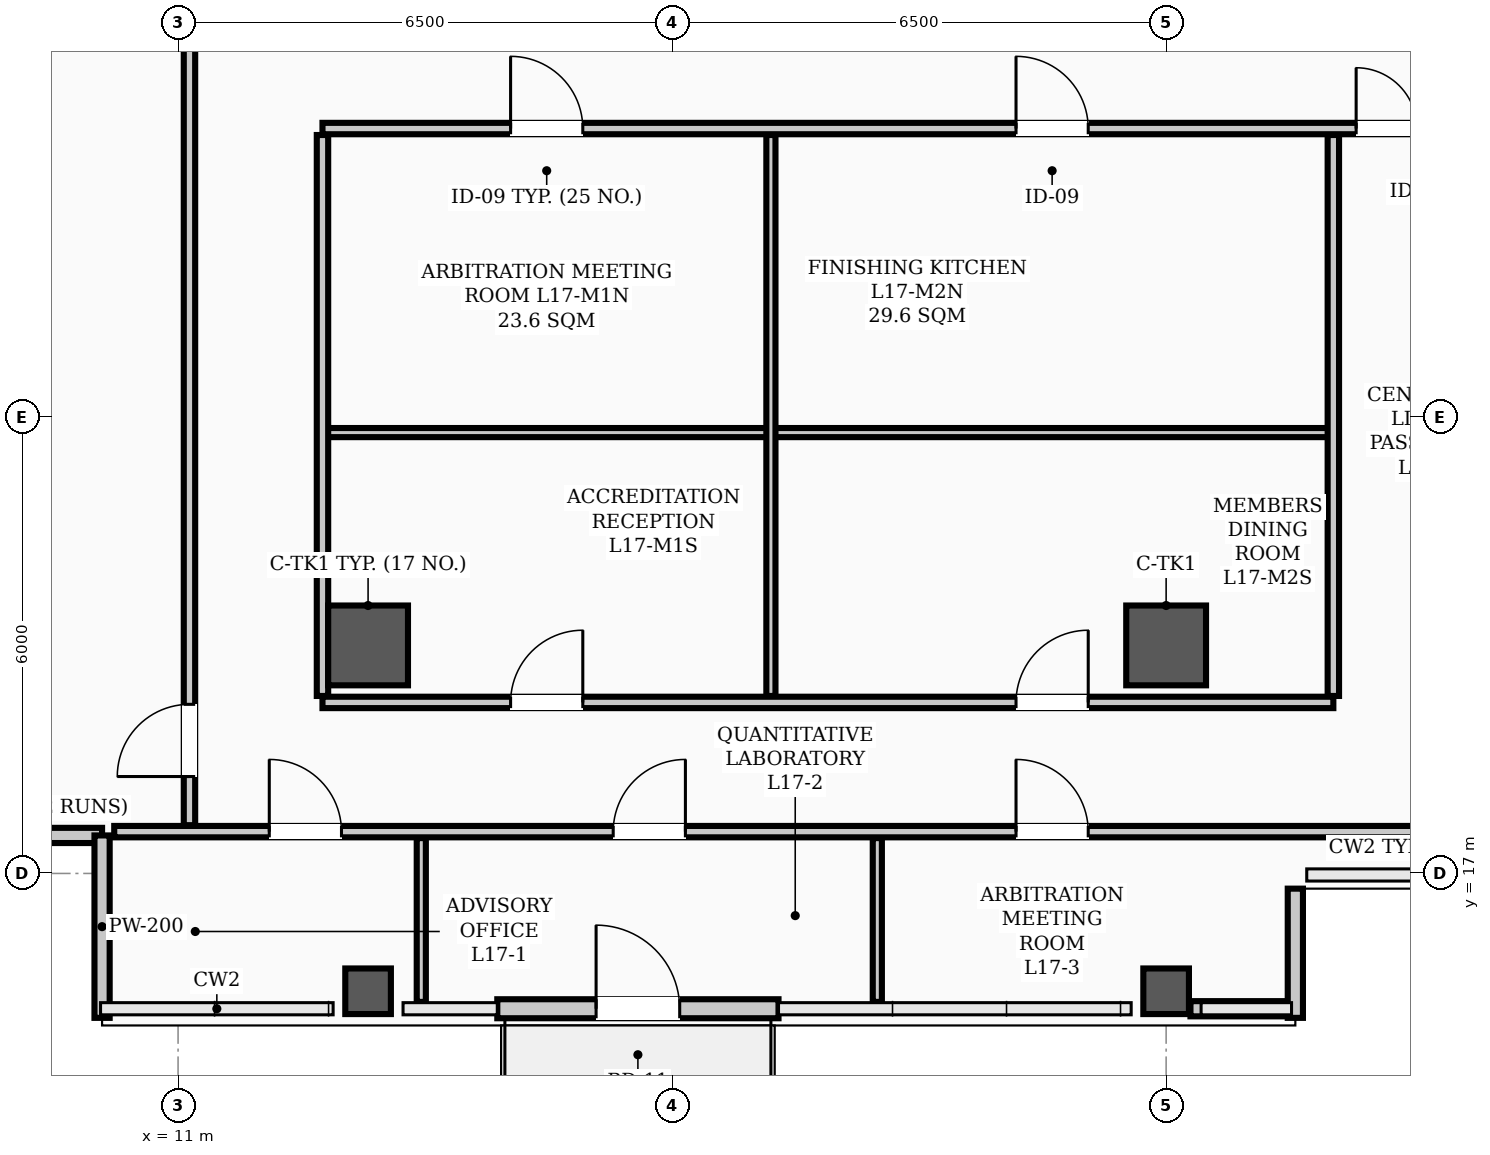
"""IFC4 building model, lengths in metres.
Left out: names, types, materials, properties, quantities, classifications, styles, units other than length and angle.
Written with IfcOpenShell. Run it as: python <this file> out.ifc"""

import sys

from ifc_helpers import new_model, si_unit, direction, frame, frame_2d, origin, origin_2d, place, context, subcontext, project, spatial, rectangle, hollow_rectangle, extrude, element, fill, save


model = new_model("IFC4")
c1 = context("Model", 3, precision=1e-05, world=origin(), true_north=direction((0.0, 1.0)))
c2 = subcontext(c1, "Body", "Model", "MODEL_VIEW")
j1 = project(units=[si_unit("LENGTHUNIT", "METRE"), si_unit("PLANEANGLEUNIT", "RADIAN")], contexts=[c1])
p1 = place(None, origin())
s1 = spatial("IfcSite", under=j1, at=p1, CompositionType="ELEMENT")
p2 = place(p1, origin())
s2 = spatial("IfcBuilding", under=s1, at=p2, CompositionType="ELEMENT")
p3 = place(p2, frame((0.0, 0.0, 69.4)))
s3 = spatial("IfcBuildingStorey", under=s2, at=p3, CompositionType="ELEMENT", Elevation=69.4)
for number, where, z_axis, x_axis in (
    (1, (13.5, 20.0, 0.0), (0.0, 0.0, 1.0), (1.0, 0.0, 0.0)),
    (2, (24.0, 20.0, 0.0), (0.0, 0.0, 1.0), (1.0, 0.0, 0.0)),
):
    element("IfcColumn", number, at=place(p3, frame(where, z_axis=z_axis, x_axis=x_axis)), inside=s3, PredefinedType="COLUMN", context=c2, shape_type="SweptSolid", body=[
        extrude(hollow_rectangle(XDim=1.05, YDim=1.05, WallThickness=0.038, InnerFilletRadius=0.019, OuterFilletRadius=0.057, at=origin_2d()), origin(), (0.0, 0.0, 1.0), 3.9),
    ])
for number, where, z_axis, x_axis in (
    (3, (13.5, 15.45, 0.0), (0.0, 0.0, 1.0), (1.0, 0.0, 0.0)),
    (4, (24.0, 15.45, 0.0), (0.0, 0.0, 1.0), (1.0, 0.0, 0.0)),
):
    element("IfcColumn", number, at=place(p3, frame(where, z_axis=z_axis, x_axis=x_axis)), inside=s3, PredefinedType="COLUMN", context=c2, shape_type="SweptSolid", body=[
        extrude(hollow_rectangle(XDim=0.6, YDim=0.6, WallThickness=0.026, InnerFilletRadius=0.013, OuterFilletRadius=0.039, at=origin_2d()), origin(), (0.0, 0.0, 1.0), 3.9),
    ])
p4 = place(p3, frame((24.32, 15.22, 0.0), z_axis=(0.0, 0.0, 1.0), x_axis=(1.0, 0.0, 0.0)))
e5 = element("IfcWall", 5, at=p4, inside=s3, PredefinedType="PARAPET", context=c2, shape_type="SweptSolid", body=[
    extrude(rectangle(XDim=1.33, YDim=0.2, at=frame_2d((0.665, 0.0))), origin(), (0.0, 0.0, 1.0), 1.2),
])
for number, where, z_axis, x_axis in (
    (6, (7.6, 17.5, 0.0), (0.0, 0.0, 1.0), (1.0, 0.0, 0.0)),
    (7, (10.0, 17.5, 0.0), (0.0, 0.0, 1.0), (0.0, -1.0, 0.0)),
):
    element("IfcWall", number, at=place(p3, frame(where, z_axis=z_axis, x_axis=x_axis)), inside=s3, PredefinedType="PARAPET", context=c2, shape_type="SweptSolid", body=[
        extrude(rectangle(XDim=2.4, YDim=0.2, at=frame_2d((1.2, 0.0))), origin(), (0.0, 0.0, 1.0), 1.2),
    ])
p5 = place(p3, frame((25.7, 15.1, 0.0), z_axis=(0.0, 0.0, 1.0), x_axis=(0.0, 1.0, 0.0)))
e8 = element("IfcWall", 8, at=p5, inside=s3, PredefinedType="PARAPET", context=c2, shape_type="SweptSolid", body=[
    extrude(rectangle(XDim=1.7, YDim=0.2, at=frame_2d((0.85, 0.0))), origin(), (0.0, 0.0, 1.0), 1.2),
])
p6 = place(p3, frame((15.2, 15.22, 0.0), z_axis=(0.0, 0.0, 1.0), x_axis=(1.0, 0.0, 0.0)))
e9 = element("IfcWall", 9, at=p6, inside=s3, PredefinedType="STANDARD", context=c2, shape_type="SweptSolid", body=[
    extrude(rectangle(XDim=3.7, YDim=0.25, at=frame_2d((1.85, 0.0))), origin(), (0.0, 0.0, 1.0), 3.18),
])
p7 = place(p6, frame((1.3, 0.0, 0.0)))
e10 = element("IfcOpeningElement", 10, at=p7, cuts=e9, PredefinedType="OPENING", context=c2, shape_type="SweptSolid", body=[
    extrude(rectangle(XDim=1.1, YDim=2.2, at=frame_2d((0.55, 1.1))), frame((0.0, 0.135, 0.0), z_axis=(0.0, -1.0, 0.0), x_axis=(1.0, 0.0, 0.0)), (0.0, 0.0, 1.0), 0.27),
])
p8 = place(p3, frame((12.9, 26.8, 0.0), z_axis=(0.0, 0.0, 1.0), x_axis=(1.0, 0.0, 0.0)))
e11 = element("IfcWall", 11, at=p8, inside=s3, PredefinedType="PARTITIONING", context=c2, shape_type="SweptSolid", body=[
    extrude(rectangle(XDim=31.7, YDim=0.15, at=frame_2d((15.85, 0.0))), origin(), (0.0, 0.0, 1.0), 3.1),
])
p9 = place(p8, frame((13.6, 0.0, 0.0)))
e12 = element("IfcOpeningElement", 12, at=p9, cuts=e11, PredefinedType="OPENING", context=c2, shape_type="SweptSolid", body=[
    extrude(rectangle(XDim=1.6, YDim=2.08, at=frame_2d((0.8, 1.04))), frame((0.0, 0.085, 0.0), z_axis=(0.0, -1.0, 0.0), x_axis=(1.0, 0.0, 0.0)), (0.0, 0.0, 1.0), 0.17),
])
p10 = place(p8, frame((2.475, 0.0, 0.0)))
e13 = element("IfcOpeningElement", 13, at=p10, cuts=e11, PredefinedType="OPENING", context=c2, shape_type="SweptSolid", body=[
    extrude(rectangle(XDim=0.95, YDim=2.08, at=frame_2d((0.475, 1.04))), frame((0.0, 0.085, 0.0), z_axis=(0.0, -1.0, 0.0), x_axis=(1.0, 0.0, 0.0)), (0.0, 0.0, 1.0), 0.17),
])
p11 = place(p8, frame((9.125, 0.0, 0.0)))
e14 = element("IfcOpeningElement", 14, at=p11, cuts=e11, PredefinedType="OPENING", context=c2, shape_type="SweptSolid", body=[
    extrude(rectangle(XDim=0.95, YDim=2.08, at=frame_2d((0.475, 1.04))), frame((0.0, 0.085, 0.0), z_axis=(0.0, -1.0, 0.0), x_axis=(1.0, 0.0, 0.0)), (0.0, 0.0, 1.0), 0.17),
])
p12 = place(p8, frame((19.125, 0.0, 0.0)))
e15 = element("IfcOpeningElement", 15, at=p12, cuts=e11, PredefinedType="OPENING", context=c2, shape_type="SweptSolid", body=[
    extrude(rectangle(XDim=0.95, YDim=2.08, at=frame_2d((0.475, 1.04))), frame((0.0, 0.085, 0.0), z_axis=(0.0, -1.0, 0.0), x_axis=(1.0, 0.0, 0.0)), (0.0, 0.0, 1.0), 0.17),
])
p13 = place(p8, frame((26.325, 0.0, 0.0)))
e16 = element("IfcOpeningElement", 16, at=p13, cuts=e11, PredefinedType="OPENING", context=c2, shape_type="SweptSolid", body=[
    extrude(rectangle(XDim=0.95, YDim=2.08, at=frame_2d((0.475, 1.04))), frame((0.0, 0.085, 0.0), z_axis=(0.0, -1.0, 0.0), x_axis=(1.0, 0.0, 0.0)), (0.0, 0.0, 1.0), 0.17),
])
p14 = place(p3, frame((10.16, 17.55, 0.0), z_axis=(0.0, 0.0, 1.0), x_axis=(1.0, 0.0, 0.0)))
e17 = element("IfcWall", 17, at=p14, inside=s3, PredefinedType="PARTITIONING", context=c2, shape_type="SweptSolid", body=[
    extrude(rectangle(XDim=44.68, YDim=0.15, at=frame_2d((22.34, 0.0))), origin(), (0.0, 0.0, 1.0), 3.1),
])
p15 = place(p14, frame((2.04, 0.0, 0.0)))
e18 = element("IfcOpeningElement", 18, at=p15, cuts=e17, PredefinedType="OPENING", context=c2, shape_type="SweptSolid", body=[
    extrude(rectangle(XDim=0.95, YDim=2.08, at=frame_2d((0.475, 1.04))), frame((0.0, 0.085, 0.0), z_axis=(0.0, -1.0, 0.0), x_axis=(1.0, 0.0, 0.0)), (0.0, 0.0, 1.0), 0.17),
])
p16 = place(p14, frame((6.565, 0.0, 0.0)))
e19 = element("IfcOpeningElement", 19, at=p16, cuts=e17, PredefinedType="OPENING", context=c2, shape_type="SweptSolid", body=[
    extrude(rectangle(XDim=0.95, YDim=2.08, at=frame_2d((0.475, 1.04))), frame((0.0, 0.085, 0.0), z_axis=(0.0, -1.0, 0.0), x_axis=(1.0, 0.0, 0.0)), (0.0, 0.0, 1.0), 0.17),
])
p17 = place(p14, frame((11.865, 0.0, 0.0)))
e20 = element("IfcOpeningElement", 20, at=p17, cuts=e17, PredefinedType="OPENING", context=c2, shape_type="SweptSolid", body=[
    extrude(rectangle(XDim=0.95, YDim=2.08, at=frame_2d((0.475, 1.04))), frame((0.0, 0.085, 0.0), z_axis=(0.0, -1.0, 0.0), x_axis=(1.0, 0.0, 0.0)), (0.0, 0.0, 1.0), 0.17),
])
p18 = place(p14, frame((24.665, 0.0, 0.0)))
e21 = element("IfcOpeningElement", 21, at=p18, cuts=e17, PredefinedType="OPENING", context=c2, shape_type="SweptSolid", body=[
    extrude(rectangle(XDim=0.95, YDim=2.08, at=frame_2d((0.475, 1.04))), frame((0.0, 0.085, 0.0), z_axis=(0.0, -1.0, 0.0), x_axis=(1.0, 0.0, 0.0)), (0.0, 0.0, 1.0), 0.17),
])
p19 = place(p14, frame((31.765, 0.0, 0.0)))
e22 = element("IfcOpeningElement", 22, at=p19, cuts=e17, PredefinedType="OPENING", context=c2, shape_type="SweptSolid", body=[
    extrude(rectangle(XDim=0.95, YDim=2.08, at=frame_2d((0.475, 1.04))), frame((0.0, 0.085, 0.0), z_axis=(0.0, -1.0, 0.0), x_axis=(1.0, 0.0, 0.0)), (0.0, 0.0, 1.0), 0.17),
])
p20 = place(p3, frame((12.9, 19.25, 0.0), z_axis=(0.0, 0.0, 1.0), x_axis=(1.0, 0.0, 0.0)))
e23 = element("IfcWall", 23, at=p20, inside=s3, PredefinedType="PARTITIONING", context=c2, shape_type="SweptSolid", body=[
    extrude(rectangle(XDim=13.3, YDim=0.15, at=frame_2d((6.65, 0.0))), origin(), (0.0, 0.0, 1.0), 3.1),
])
p21 = place(p20, frame((2.475, 0.0, 0.0)))
e24 = element("IfcOpeningElement", 24, at=p21, cuts=e23, PredefinedType="OPENING", context=c2, shape_type="SweptSolid", body=[
    extrude(rectangle(XDim=0.95, YDim=2.08, at=frame_2d((0.475, 1.04))), frame((0.0, 0.085, 0.0), z_axis=(0.0, -1.0, 0.0), x_axis=(1.0, 0.0, 0.0)), (0.0, 0.0, 1.0), 0.17),
])
p22 = place(p20, frame((9.125, 0.0, 0.0)))
e25 = element("IfcOpeningElement", 25, at=p22, cuts=e23, PredefinedType="OPENING", context=c2, shape_type="SweptSolid", body=[
    extrude(rectangle(XDim=0.95, YDim=2.08, at=frame_2d((0.475, 1.04))), frame((0.0, 0.085, 0.0), z_axis=(0.0, -1.0, 0.0), x_axis=(1.0, 0.0, 0.0)), (0.0, 0.0, 1.0), 0.17),
])
p23 = place(p3, frame((12.9, 22.8, 0.0), z_axis=(0.0, 0.0, 1.0), x_axis=(1.0, 0.0, 0.0)))
e26 = element("IfcWall", 26, at=p23, inside=s3, PredefinedType="PARTITIONING", context=c2, shape_type="SweptSolid", body=[
    extrude(rectangle(XDim=5.9, YDim=0.12, at=frame_2d((2.95, 0.0))), origin(), (0.0, 0.0, 1.0), 3.1),
])
p24 = place(p3, frame((18.8, 22.8, 0.0), z_axis=(0.0, 0.0, 1.0), x_axis=(1.0, 0.0, 0.0)))
e27 = element("IfcWall", 27, at=p24, inside=s3, PredefinedType="PARTITIONING", context=c2, shape_type="SweptSolid", body=[
    extrude(rectangle(XDim=7.4, YDim=0.12, at=frame_2d((3.7, 0.0))), origin(), (0.0, 0.0, 1.0), 3.1),
])
p25 = place(p3, frame((26.2, 19.335, 0.0), z_axis=(0.0, 0.0, 1.0), x_axis=(0.0, 1.0, 0.0)))
e28 = element("IfcWall", 28, at=p25, inside=s3, PredefinedType="PARTITIONING", context=c2, shape_type="SweptSolid", body=[
    extrude(rectangle(XDim=7.38, YDim=0.15, at=frame_2d((3.69, 0.0))), origin(), (0.0, 0.0, 1.0), 3.0),
])
p26 = place(p3, frame((11.15, 17.635, 0.0), z_axis=(0.0, 0.0, 1.0), x_axis=(0.0, 1.0, 0.0)))
e29 = element("IfcWall", 29, at=p26, inside=s3, PredefinedType="PARTITIONING", context=c2, shape_type="SweptSolid", body=[
    extrude(rectangle(XDim=22.53, YDim=0.15, at=frame_2d((11.265, 0.0))), origin(), (0.0, 0.0, 1.0), 3.0),
])
p27 = place(p26, frame((0.64, 0.0, 0.0)))
e30 = element("IfcOpeningElement", 30, at=p27, cuts=e29, PredefinedType="OPENING", context=c2, shape_type="SweptSolid", body=[
    extrude(rectangle(XDim=0.95, YDim=2.08, at=frame_2d((0.475, 1.04))), frame((0.0, 0.085, 0.0), z_axis=(0.0, -1.0, 0.0), x_axis=(1.0, 0.0, 0.0)), (0.0, 0.0, 1.0), 0.17),
])
p28 = place(p3, frame((12.9, 19.335, 0.0), z_axis=(0.0, 0.0, 1.0), x_axis=(0.0, 1.0, 0.0)))
e31 = element("IfcWall", 31, at=p28, inside=s3, PredefinedType="PARTITIONING", context=c2, shape_type="SweptSolid", body=[
    extrude(rectangle(XDim=7.38, YDim=0.15, at=frame_2d((3.69, 0.0))), origin(), (0.0, 0.0, 1.0), 3.0),
])
for number, where, z_axis, x_axis in (
    (32, (14.2, 15.31, 0.0), (0.0, 0.0, 1.0), (0.0, 1.0, 0.0)),
    (33, (20.2, 15.31, 0.0), (0.0, 0.0, 1.0), (0.0, 1.0, 0.0)),
):
    element("IfcWall", number, at=place(p3, frame(where, z_axis=z_axis, x_axis=x_axis)), inside=s3, PredefinedType="PARTITIONING", context=c2, shape_type="SweptSolid", body=[
        extrude(rectangle(XDim=2.155, YDim=0.12, at=frame_2d((1.078, 0.0))), origin(), (0.0, 0.0, 1.0), 3.212),
    ])
p29 = place(p3, frame((18.8, 19.335, 0.0), z_axis=(0.0, 0.0, 1.0), x_axis=(0.0, 1.0, 0.0)))
e34 = element("IfcWall", 34, at=p29, inside=s3, PredefinedType="PARTITIONING", context=c2, shape_type="SweptSolid", body=[
    extrude(rectangle(XDim=7.38, YDim=0.12, at=frame_2d((3.69, 0.0))), origin(), (0.0, 0.0, 1.0), 3.0),
])
p30 = place(p7, origin())
e35 = element("IfcDoor", 35, at=p30, inside=s3, OperationType="SINGLE_SWING_LEFT", PredefinedType="DOOR", context=c2, shape_type="SweptSolid", body=[
    extrude(rectangle(XDim=1.1, YDim=2.2, at=frame_2d((0.55, 1.1))), frame((0.0, 0.025, 0.0), z_axis=(0.0, -1.0, 0.0), x_axis=(1.0, 0.0, 0.0)), (0.0, 0.0, 1.0), 0.05),
])
fill(e10, e35)
p31 = place(p9, origin())
e36 = element("IfcDoor", 36, at=p31, inside=s3, OperationType="DOUBLE_DOOR_SINGLE_SWING", PredefinedType="DOOR", context=c2, shape_type="SweptSolid", body=[
    extrude(rectangle(XDim=1.6, YDim=2.08, at=frame_2d((0.8, 1.04))), frame((0.0, 0.025, 0.0), z_axis=(0.0, -1.0, 0.0), x_axis=(1.0, 0.0, 0.0)), (0.0, 0.0, 1.0), 0.05),
])
fill(e12, e36)
p32 = place(p15, origin())
e37 = element("IfcDoor", 37, at=p32, inside=s3, OperationType="SINGLE_SWING_LEFT", PredefinedType="DOOR", context=c2, shape_type="SweptSolid", body=[
    extrude(rectangle(XDim=0.95, YDim=2.08, at=frame_2d((0.475, 1.04))), frame((0.0, 0.025, 0.0), z_axis=(0.0, -1.0, 0.0), x_axis=(1.0, 0.0, 0.0)), (0.0, 0.0, 1.0), 0.05),
])
fill(e18, e37)
p33 = place(p16, origin())
e38 = element("IfcDoor", 38, at=p33, inside=s3, OperationType="SINGLE_SWING_RIGHT", PredefinedType="DOOR", context=c2, shape_type="SweptSolid", body=[
    extrude(rectangle(XDim=0.95, YDim=2.08, at=frame_2d((0.475, 1.04))), frame((0.0, 0.025, 0.0), z_axis=(0.0, -1.0, 0.0), x_axis=(1.0, 0.0, 0.0)), (0.0, 0.0, 1.0), 0.05),
])
fill(e19, e38)
p34 = place(p17, origin())
e39 = element("IfcDoor", 39, at=p34, inside=s3, OperationType="SINGLE_SWING_LEFT", PredefinedType="DOOR", context=c2, shape_type="SweptSolid", body=[
    extrude(rectangle(XDim=0.95, YDim=2.08, at=frame_2d((0.475, 1.04))), frame((0.0, 0.025, 0.0), z_axis=(0.0, -1.0, 0.0), x_axis=(1.0, 0.0, 0.0)), (0.0, 0.0, 1.0), 0.05),
])
fill(e20, e39)
p35 = place(p10, origin())
e40 = element("IfcDoor", 40, at=p35, inside=s3, OperationType="SINGLE_SWING_LEFT", PredefinedType="DOOR", context=c2, shape_type="SweptSolid", body=[
    extrude(rectangle(XDim=0.95, YDim=2.08, at=frame_2d((0.475, 1.04))), frame((0.0, 0.025, 0.0), z_axis=(0.0, -1.0, 0.0), x_axis=(1.0, 0.0, 0.0)), (0.0, 0.0, 1.0), 0.05),
])
fill(e13, e40)
p36 = place(p21, origin())
e41 = element("IfcDoor", 41, at=p36, inside=s3, OperationType="SINGLE_SWING_RIGHT", PredefinedType="DOOR", context=c2, shape_type="SweptSolid", body=[
    extrude(rectangle(XDim=0.95, YDim=2.08, at=frame_2d((0.475, 1.04))), frame((0.0, 0.025, 0.0), z_axis=(0.0, -1.0, 0.0), x_axis=(1.0, 0.0, 0.0)), (0.0, 0.0, 1.0), 0.05),
])
fill(e24, e41)
p37 = place(p11, origin())
e42 = element("IfcDoor", 42, at=p37, inside=s3, OperationType="SINGLE_SWING_LEFT", PredefinedType="DOOR", context=c2, shape_type="SweptSolid", body=[
    extrude(rectangle(XDim=0.95, YDim=2.08, at=frame_2d((0.475, 1.04))), frame((0.0, 0.025, 0.0), z_axis=(0.0, -1.0, 0.0), x_axis=(1.0, 0.0, 0.0)), (0.0, 0.0, 1.0), 0.05),
])
fill(e14, e42)
p38 = place(p22, origin())
e43 = element("IfcDoor", 43, at=p38, inside=s3, OperationType="SINGLE_SWING_RIGHT", PredefinedType="DOOR", context=c2, shape_type="SweptSolid", body=[
    extrude(rectangle(XDim=0.95, YDim=2.08, at=frame_2d((0.475, 1.04))), frame((0.0, 0.025, 0.0), z_axis=(0.0, -1.0, 0.0), x_axis=(1.0, 0.0, 0.0)), (0.0, 0.0, 1.0), 0.05),
])
fill(e25, e43)
p39 = place(p27, origin())
e44 = element("IfcDoor", 44, at=p39, inside=s3, OperationType="SINGLE_SWING_LEFT", PredefinedType="DOOR", context=c2, shape_type="SweptSolid", body=[
    extrude(rectangle(XDim=0.95, YDim=2.08, at=frame_2d((0.475, 1.04))), frame((0.0, 0.025, 0.0), z_axis=(0.0, -1.0, 0.0), x_axis=(1.0, 0.0, 0.0)), (0.0, 0.0, 1.0), 0.05),
])
fill(e30, e44)
save(model, sys.argv[1])
